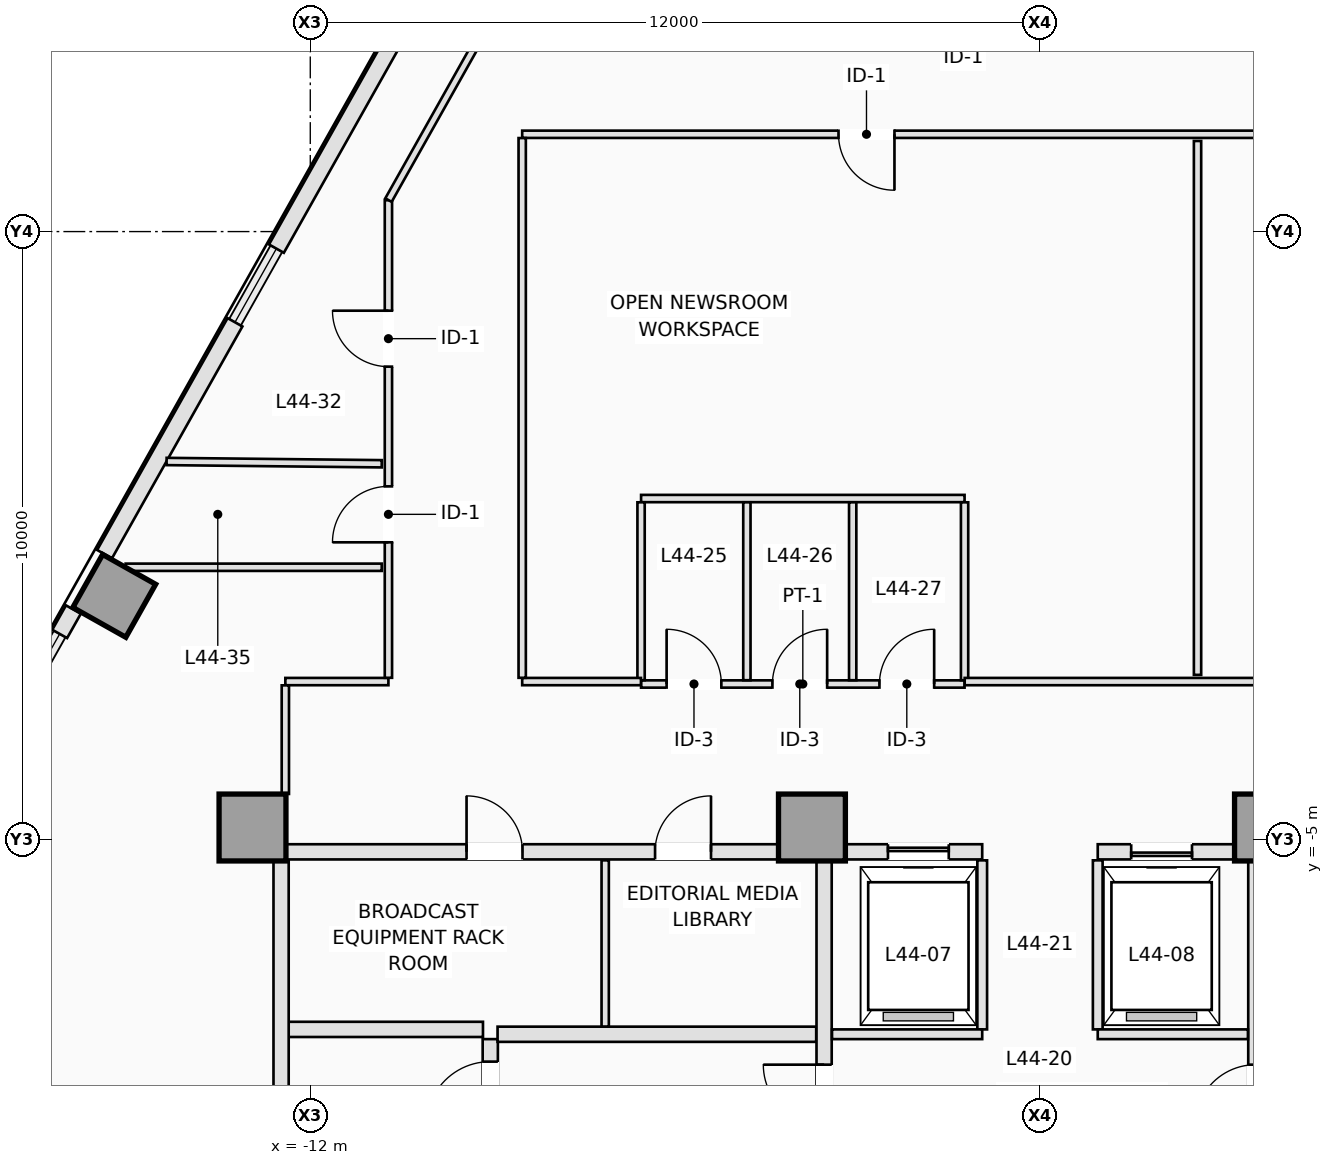
"""IFC4 building model, lengths in metres.
Left out: names, types, materials, properties, quantities, classifications, styles, units other than length and angle.
Written with IfcOpenShell. Run it as: python <this file> out.ifc"""

import sys

from ifc_helpers import new_model, si_unit, direction, frame, frame_2d, origin, origin_2d, place, context, subcontext, project, spatial, rectangle, extrude, element, fill, save


model = new_model("IFC4")
c1 = context("Model", 3, precision=1e-05, world=origin(), true_north=direction((0.0, 1.0)))
c2 = subcontext(c1, "Body", "Model", "MODEL_VIEW")
j1 = project(units=[si_unit("LENGTHUNIT", "METRE"), si_unit("PLANEANGLEUNIT", "RADIAN")], contexts=[c1])
p1 = place(None, origin())
s1 = spatial("IfcSite", under=j1, at=p1, CompositionType="ELEMENT")
p2 = place(p1, origin())
s2 = spatial("IfcBuilding", under=s1, at=p2, CompositionType="ELEMENT")
p3 = place(p2, frame((0.0, 0.0, 161.5)))
s3 = spatial("IfcBuildingStorey", under=s2, at=p3, CompositionType="ELEMENT", Elevation=161.5)
for number, where, z_axis, x_axis in (
    (1, (-12.95, -4.8, 0.0), (0.0, 0.0, 1.0), (1.0, 0.0, 0.0)),
    (2, (-3.75, -4.8, 0.0), (0.0, 0.0, 1.0), (1.0, 0.0, 0.0)),
    (3, (3.75, -4.8, 0.0), (0.0, 0.0, 1.0), (1.0, 0.0, 0.0)),
):
    element("IfcColumn", number, at=place(p3, frame(where, z_axis=z_axis, x_axis=x_axis)), inside=s3, PredefinedType="COLUMN", context=c2, shape_type="SweptSolid", body=[
        extrude(rectangle(XDim=1.1, YDim=1.1, at=origin_2d()), origin(), (0.0, 0.0, 1.0), 3.5),
    ])
p4 = place(p3, frame((-15.224, -0.991, 0.0), z_axis=(0.0, 0.0, 1.0), x_axis=(-0.871575139605, 0.490261946333, 0.0)))
e4 = element("IfcColumn", 4, at=p4, inside=s3, PredefinedType="COLUMN", context=c2, shape_type="SweptSolid", body=[
    extrude(rectangle(XDim=1.0, YDim=1.0, at=origin_2d()), origin(), (0.0, 0.0, 1.0), 3.5),
])
p5 = place(p3, frame((-16.121, -1.616, 0.0), z_axis=(0.0, 0.0, 1.0), x_axis=(0.490009165718, 0.871717280724, 0.0)))
e5 = element("IfcWall", 5, at=p5, inside=s3, PredefinedType="STANDARD", context=c2, shape_type="SweptSolid", body=[
    extrude(rectangle(XDim=0.46, YDim=0.28, at=frame_2d((0.23, 0.0))), origin(), (0.0, 0.0, 1.0), 3.25),
])
p6 = place(p3, frame((-15.383, -0.305, 0.0), z_axis=(0.0, 0.0, 1.0), x_axis=(0.490232095789, 0.871591929895, 0.0)))
e6 = element("IfcWall", 6, at=p6, inside=s3, PredefinedType="STANDARD", context=c2, shape_type="SweptSolid", body=[
    extrude(rectangle(XDim=4.375, YDim=0.28, at=frame_2d((2.188, 0.0))), origin(), (0.0, 0.0, 1.0), 3.25),
])
p7 = place(p3, frame((-12.557, 4.72, 0.0), z_axis=(0.0, 0.0, 1.0), x_axis=(0.490274486291, 0.871568085747, 0.0)))
e7 = element("IfcWall", 7, at=p7, inside=s3, PredefinedType="STANDARD", context=c2, shape_type="SweptSolid", body=[
    extrude(rectangle(XDim=4.375, YDim=0.28, at=frame_2d((2.188, 0.0))), origin(), (0.0, 0.0, 1.0), 3.25),
])
p8 = place(p3, frame((-9.04, -10.18, 0.0), z_axis=(0.0, 0.0, 1.0), x_axis=(0.0, 1.0, 0.0)))
e8 = element("IfcWall", 8, at=p8, inside=s3, PredefinedType="PARTITIONING", context=c2, shape_type="SweptSolid", body=[
    extrude(rectangle(XDim=1.9, YDim=0.25, at=frame_2d((0.95, 0.0))), origin(), (0.0, 0.0, 1.0), 3.25),
])
p9 = place(p8, frame((0.48, 0.0, 0.0)))
e9 = element("IfcOpeningElement", 9, at=p9, cuts=e8, PredefinedType="OPENING", context=c2, shape_type="SweptSolid", body=[
    extrude(rectangle(XDim=1.05, YDim=2.15, at=frame_2d((0.525, 1.075))), frame((0.0, 0.135, 0.0), z_axis=(0.0, -1.0, 0.0), x_axis=(1.0, 0.0, 0.0)), (0.0, 0.0, 1.0), 0.27),
])
p10 = place(p3, frame((-12.38, -8.12, 0.0), z_axis=(0.0, 0.0, 1.0), x_axis=(1.0, 0.0, 0.0)))
e10 = element("IfcWall", 10, at=p10, inside=s3, PredefinedType="PARTITIONING", context=c2, shape_type="SweptSolid", body=[
    extrude(rectangle(XDim=3.22, YDim=0.25, at=frame_2d((1.61, 0.0))), origin(), (0.0, 0.0, 1.0), 3.25),
])
p11 = place(p3, frame((-12.48, -10.18, 0.0), z_axis=(0.0, 0.0, 1.0), x_axis=(0.0, 1.0, 0.0)))
e11 = element("IfcWall", 11, at=p11, inside=s3, PredefinedType="PARTITIONING", context=c2, shape_type="SweptSolid", body=[
    extrude(rectangle(XDim=4.828, YDim=0.25, at=frame_2d((2.414, 0.0))), origin(), (0.0, 0.0, 1.0), 3.25),
])
p12 = place(p3, frame((-8.92, -8.2, 0.0), z_axis=(0.0, 0.0, 1.0), x_axis=(1.0, 0.0, 0.0)))
e12 = element("IfcWall", 12, at=p12, inside=s3, PredefinedType="PARTITIONING", context=c2, shape_type="SweptSolid", body=[
    extrude(rectangle(XDim=5.24, YDim=0.25, at=frame_2d((2.62, 0.0))), origin(), (0.0, 0.0, 1.0), 3.25),
])
p13 = place(p3, frame((-3.55, -15.798, 0.0), z_axis=(0.0, 0.0, 1.0), x_axis=(0.0, 1.0, 0.0)))
e13 = element("IfcWall", 13, at=p13, inside=s3, PredefinedType="PARTITIONING", context=c2, shape_type="SweptSolid", body=[
    extrude(rectangle(XDim=10.446, YDim=0.25, at=frame_2d((5.223, 0.0))), origin(), (0.0, 0.0, 1.0), 3.25),
])
p14 = place(p13, frame((6.098, 0.0, 0.0)))
e14 = element("IfcOpeningElement", 14, at=p14, cuts=e13, PredefinedType="OPENING", context=c2, shape_type="SweptSolid", body=[
    extrude(rectangle(XDim=1.0, YDim=2.15, at=frame_2d((0.5, 1.075))), frame((0.0, 0.135, 0.0), z_axis=(0.0, -1.0, 0.0), x_axis=(1.0, 0.0, 0.0)), (0.0, 0.0, 1.0), 0.27),
])
p15 = place(p3, frame((3.55, -15.798, 0.0), z_axis=(0.0, 0.0, 1.0), x_axis=(0.0, 1.0, 0.0)))
e15 = element("IfcWall", 15, at=p15, inside=s3, PredefinedType="PARTITIONING", context=c2, shape_type="SweptSolid", body=[
    extrude(rectangle(XDim=10.446, YDim=0.25, at=frame_2d((5.223, 0.0))), origin(), (0.0, 0.0, 1.0), 3.25),
])
p16 = place(p15, frame((6.098, 0.0, 0.0)))
e16 = element("IfcOpeningElement", 16, at=p16, cuts=e15, PredefinedType="OPENING", context=c2, shape_type="SweptSolid", body=[
    extrude(rectangle(XDim=1.0, YDim=2.15, at=frame_2d((0.5, 1.075))), frame((0.0, 0.135, 0.0), z_axis=(0.0, -1.0, 0.0), x_axis=(1.0, 0.0, 0.0)), (0.0, 0.0, 1.0), 0.27),
])
p17 = place(p3, frame((-12.398, -5.2, 0.0), z_axis=(0.0, 0.0, 1.0), x_axis=(1.0, 0.0, 0.0)))
e17 = element("IfcWall", 17, at=p17, inside=s3, PredefinedType="PARTITIONING", context=c2, shape_type="SweptSolid", body=[
    extrude(rectangle(XDim=8.096, YDim=0.25, at=frame_2d((4.048, 0.0))), origin(), (0.0, 0.0, 1.0), 3.25),
])
p18 = place(p17, frame((2.968, 0.0, 0.0)))
e18 = element("IfcOpeningElement", 18, at=p18, cuts=e17, PredefinedType="OPENING", context=c2, shape_type="SweptSolid", body=[
    extrude(rectangle(XDim=0.92, YDim=2.12, at=frame_2d((0.46, 1.06))), frame((0.0, 0.135, 0.0), z_axis=(0.0, -1.0, 0.0), x_axis=(1.0, 0.0, 0.0)), (0.0, 0.0, 1.0), 0.27),
])
p19 = place(p17, frame((6.068, 0.0, 0.0)))
e19 = element("IfcOpeningElement", 19, at=p19, cuts=e17, PredefinedType="OPENING", context=c2, shape_type="SweptSolid", body=[
    extrude(rectangle(XDim=0.92, YDim=2.12, at=frame_2d((0.46, 1.06))), frame((0.0, 0.135, 0.0), z_axis=(0.0, -1.0, 0.0), x_axis=(1.0, 0.0, 0.0)), (0.0, 0.0, 1.0), 0.27),
])
p20 = place(p3, frame((-3.198, -5.2, 0.0), z_axis=(0.0, 0.0, 1.0), x_axis=(1.0, 0.0, 0.0)))
e20 = element("IfcWall", 20, at=p20, inside=s3, PredefinedType="PARTITIONING", context=c2, shape_type="SweptSolid", body=[
    extrude(rectangle(XDim=2.248, YDim=0.25, at=frame_2d((1.124, 0.0))), origin(), (0.0, 0.0, 1.0), 3.25),
])
p21 = place(p20, frame((0.698, 0.0, 0.0)))
e21 = element("IfcOpeningElement", 21, at=p21, cuts=e20, PredefinedType="OPENING", context=c2, shape_type="SweptSolid", body=[
    extrude(rectangle(XDim=1.0, YDim=2.15, at=frame_2d((0.5, 1.075))), frame((0.0, 0.135, 0.0), z_axis=(0.0, -1.0, 0.0), x_axis=(1.0, 0.0, 0.0)), (0.0, 0.0, 1.0), 0.27),
])
p22 = place(p3, frame((0.95, -5.2, 0.0), z_axis=(0.0, 0.0, 1.0), x_axis=(1.0, 0.0, 0.0)))
e22 = element("IfcWall", 22, at=p22, inside=s3, PredefinedType="PARTITIONING", context=c2, shape_type="SweptSolid", body=[
    extrude(rectangle(XDim=2.248, YDim=0.25, at=frame_2d((1.124, 0.0))), origin(), (0.0, 0.0, 1.0), 3.25),
])
p23 = place(p22, frame((0.55, 0.0, 0.0)))
e23 = element("IfcOpeningElement", 23, at=p23, cuts=e22, PredefinedType="OPENING", context=c2, shape_type="SweptSolid", body=[
    extrude(rectangle(XDim=1.0, YDim=2.15, at=frame_2d((0.5, 1.075))), frame((0.0, 0.135, 0.0), z_axis=(0.0, -1.0, 0.0), x_axis=(1.0, 0.0, 0.0)), (0.0, 0.0, 1.0), 0.27),
])
p24 = place(p3, frame((-7.15, -8.073, 0.0), z_axis=(0.0, 0.0, 1.0), x_axis=(0.0, 1.0, 0.0)))
e24 = element("IfcWall", 24, at=p24, inside=s3, PredefinedType="PARTITIONING", context=c2, shape_type="SweptSolid", body=[
    extrude(rectangle(XDim=2.733, YDim=0.12, at=frame_2d((1.366, 0.0))), origin(), (0.0, 0.0, 1.0), 3.25),
])
for number, where, z_axis, x_axis in (
    (25, (-0.95, -8.12, 0.0), (0.0, 0.0, 1.0), (0.0, 1.0, 0.0)),
    (26, (0.95, -8.12, 0.0), (0.0, 0.0, 1.0), (0.0, 1.0, 0.0)),
):
    element("IfcWall", number, at=place(p3, frame(where, z_axis=z_axis, x_axis=x_axis)), inside=s3, PredefinedType="PARTITIONING", context=c2, shape_type="SweptSolid", body=[
        extrude(rectangle(XDim=2.78, YDim=0.16, at=frame_2d((1.39, 0.0))), origin(), (0.0, 0.0, 1.0), 3.25),
    ])
for number, where, z_axis, x_axis in (
    (27, (-3.42, -8.2, 0.0), (0.0, 0.0, 1.0), (1.0, 0.0, 0.0)),
    (28, (0.95, -8.2, 0.0), (0.0, 0.0, 1.0), (1.0, 0.0, 0.0)),
):
    element("IfcWall", number, at=place(p3, frame(where, z_axis=z_axis, x_axis=x_axis)), inside=s3, PredefinedType="PARTITIONING", context=c2, shape_type="SweptSolid", body=[
        extrude(rectangle(XDim=2.47, YDim=0.16, at=frame_2d((1.235, 0.0))), origin(), (0.0, 0.0, 1.0), 3.25),
    ])
p25 = place(p3, frame((-6.56, -2.44, 0.0), z_axis=(0.0, 0.0, 1.0), x_axis=(1.0, 0.0, 0.0)))
e29 = element("IfcWall", 29, at=p25, inside=s3, PredefinedType="PARTITIONING", context=c2, shape_type="SweptSolid", body=[
    extrude(rectangle(XDim=5.32, YDim=0.12, at=frame_2d((2.66, 0.0))), origin(), (0.0, 0.0, 1.0), 2.891),
])
p26 = place(p25, frame((0.42, 0.0, 0.0)))
e30 = element("IfcOpeningElement", 30, at=p26, cuts=e29, PredefinedType="OPENING", context=c2, shape_type="SweptSolid", body=[
    extrude(rectangle(XDim=0.9, YDim=2.12, at=frame_2d((0.45, 1.06))), frame((0.0, 0.07, 0.0), z_axis=(0.0, -1.0, 0.0), x_axis=(1.0, 0.0, 0.0)), (0.0, 0.0, 1.0), 0.14),
])
p27 = place(p25, frame((2.16, 0.0, 0.0)))
e31 = element("IfcOpeningElement", 31, at=p27, cuts=e29, PredefinedType="OPENING", context=c2, shape_type="SweptSolid", body=[
    extrude(rectangle(XDim=0.9, YDim=2.12, at=frame_2d((0.45, 1.06))), frame((0.0, 0.07, 0.0), z_axis=(0.0, -1.0, 0.0), x_axis=(1.0, 0.0, 0.0)), (0.0, 0.0, 1.0), 0.14),
])
p28 = place(p25, frame((3.92, 0.0, 0.0)))
e32 = element("IfcOpeningElement", 32, at=p28, cuts=e29, PredefinedType="OPENING", context=c2, shape_type="SweptSolid", body=[
    extrude(rectangle(XDim=0.9, YDim=2.12, at=frame_2d((0.45, 1.06))), frame((0.0, 0.07, 0.0), z_axis=(0.0, -1.0, 0.0), x_axis=(1.0, 0.0, 0.0)), (0.0, 0.0, 1.0), 0.14),
])
p29 = place(p3, frame((-6.56, 0.61, 0.0), z_axis=(0.0, 0.0, 1.0), x_axis=(1.0, 0.0, 0.0)))
e33 = element("IfcWall", 33, at=p29, inside=s3, PredefinedType="PARTITIONING", context=c2, shape_type="SweptSolid", body=[
    extrude(rectangle(XDim=5.32, YDim=0.12, at=frame_2d((2.66, 0.0))), origin(), (0.0, 0.0, 1.0), 3.25),
])
for number, where, z_axis, x_axis in (
    (34, (-6.56, -2.378, 0.0), (0.0, 0.0, 1.0), (0.0, 1.0, 0.0)),
    (35, (-4.82, -2.378, 0.0), (0.0, 0.0, 1.0), (0.0, 1.0, 0.0)),
    (36, (-3.08, -2.378, 0.0), (0.0, 0.0, 1.0), (0.0, 1.0, 0.0)),
    (37, (-1.24, -2.378, 0.0), (0.0, 0.0, 1.0), (0.0, 1.0, 0.0)),
):
    element("IfcWall", number, at=place(p3, frame(where, z_axis=z_axis, x_axis=x_axis)), inside=s3, PredefinedType="PARTITIONING", context=c2, shape_type="SweptSolid", body=[
        extrude(rectangle(XDim=2.926, YDim=0.12, at=frame_2d((1.463, 0.0))), origin(), (0.0, 0.0, 1.0), 3.25),
    ])
p30 = place(p3, frame((-12.41, -2.4, 0.0), z_axis=(0.0, 0.0, 1.0), x_axis=(1.0, 0.0, 0.0)))
e38 = element("IfcWall", 38, at=p30, inside=s3, PredefinedType="PARTITIONING", context=c2, shape_type="SweptSolid", body=[
    extrude(rectangle(XDim=1.695, YDim=0.12, at=frame_2d((0.847, 0.0))), origin(), (0.0, 0.0, 1.0), 3.25),
])
p31 = place(p3, frame((-10.715, -2.338, 0.0), z_axis=(0.0, 0.0, 1.0), x_axis=(0.0, 1.0, 0.0)))
e39 = element("IfcWall", 39, at=p31, inside=s3, PredefinedType="PARTITIONING", context=c2, shape_type="SweptSolid", body=[
    extrude(rectangle(XDim=7.854, YDim=0.12, at=frame_2d((3.927, 0.0))), origin(), (0.0, 0.0, 1.0), 3.25),
])
p32 = place(p31, frame((5.117, 0.0, 0.0)))
e40 = element("IfcOpeningElement", 40, at=p32, cuts=e39, PredefinedType="OPENING", context=c2, shape_type="SweptSolid", body=[
    extrude(rectangle(XDim=0.92, YDim=2.12, at=frame_2d((0.46, 1.06))), frame((0.0, 0.07, 0.0), z_axis=(0.0, -1.0, 0.0), x_axis=(1.0, 0.0, 0.0)), (0.0, 0.0, 1.0), 0.14),
])
p33 = place(p31, frame((2.228, 0.0, 0.0)))
e41 = element("IfcOpeningElement", 41, at=p33, cuts=e39, PredefinedType="OPENING", context=c2, shape_type="SweptSolid", body=[
    extrude(rectangle(XDim=0.92, YDim=2.12, at=frame_2d((0.46, 1.06))), frame((0.0, 0.07, 0.0), z_axis=(0.0, -1.0, 0.0), x_axis=(1.0, 0.0, 0.0)), (0.0, 0.0, 1.0), 0.14),
])
p34 = place(p3, frame((-10.714, 5.518, 0.0), z_axis=(0.0, 0.0, 1.0), x_axis=(0.490248927543, 0.871582462561, 0.0)))
e42 = element("IfcWall", 42, at=p34, inside=s3, PredefinedType="PARTITIONING", context=c2, shape_type="SweptSolid", body=[
    extrude(rectangle(XDim=3.766, YDim=0.12, at=frame_2d((1.883, 0.0))), origin(), (0.0, 0.0, 1.0), 3.25),
])
p35 = place(p3, frame((-12.41, -4.248, 0.0), z_axis=(0.0, 0.0, 1.0), x_axis=(0.0, 1.0, 0.0)))
e43 = element("IfcWall", 43, at=p35, inside=s3, PredefinedType="PARTITIONING", context=c2, shape_type="SweptSolid", body=[
    extrude(rectangle(XDim=1.786, YDim=0.12, at=frame_2d((0.893, 0.0))), origin(), (0.0, 0.0, 1.0), 3.25),
])
p36 = place(p3, frame((-8.515, -2.4, 0.0), z_axis=(0.0, 0.0, 1.0), x_axis=(1.0, 0.0, 0.0)))
e44 = element("IfcWall", 44, at=p36, inside=s3, PredefinedType="PARTITIONING", context=c2, shape_type="SweptSolid", body=[
    extrude(rectangle(XDim=1.953, YDim=0.12, at=frame_2d((0.977, 0.0))), origin(), (0.0, 0.0, 1.0), 3.25),
])
p37 = place(p3, frame((-1.238, -2.4, 0.0), z_axis=(0.0, 0.0, 1.0), x_axis=(1.0, 0.0, 0.0)))
e45 = element("IfcWall", 45, at=p37, inside=s3, PredefinedType="PARTITIONING", context=c2, shape_type="SweptSolid", body=[
    extrude(rectangle(XDim=10.023, YDim=0.12, at=frame_2d((5.011, 0.0))), origin(), (0.0, 0.0, 1.0), 2.891),
])
p38 = place(p3, frame((8.723, 6.6, 0.0), z_axis=(0.0, 0.0, 1.0), x_axis=(-1.0, 0.0, 0.0)))
e46 = element("IfcWall", 46, at=p38, inside=s3, PredefinedType="PARTITIONING", context=c2, shape_type="SweptSolid", body=[
    extrude(rectangle(XDim=17.238, YDim=0.12, at=frame_2d((8.619, 0.0))), origin(), (0.0, 0.0, 1.0), 2.891),
])
p39 = place(p38, frame((11.116, 0.0, 0.0)))
e47 = element("IfcOpeningElement", 47, at=p39, cuts=e46, PredefinedType="OPENING", context=c2, shape_type="SweptSolid", body=[
    extrude(rectangle(XDim=0.92, YDim=2.12, at=frame_2d((0.46, 1.06))), frame((0.0, 0.07, 0.0), z_axis=(0.0, -1.0, 0.0), x_axis=(1.0, 0.0, 0.0)), (0.0, 0.0, 1.0), 0.14),
])
p40 = place(p3, frame((-8.515, 6.538, 0.0), z_axis=(0.0, 0.0, 1.0), x_axis=(0.0, -1.0, 0.0)))
e48 = element("IfcWall", 48, at=p40, inside=s3, PredefinedType="PARTITIONING", context=c2, shape_type="SweptSolid", body=[
    extrude(rectangle(XDim=8.876, YDim=0.12, at=frame_2d((4.438, 0.0))), origin(), (0.0, 0.0, 1.0), 3.25),
])
p41 = place(p3, frame((-10.825, 1.182, 0.0), z_axis=(0.0, 0.0, 1.0), x_axis=(-0.999943542972, 0.010625952637, 0.0)))
e49 = element("IfcWall", 49, at=p41, inside=s3, PredefinedType="PARTITIONING", context=c2, shape_type="SweptSolid", body=[
    extrude(rectangle(XDim=3.538, YDim=0.12, at=frame_2d((1.769, 0.0))), origin(), (0.0, 0.0, 1.0), 3.25),
])
p42 = place(p3, frame((2.591, 6.49, 0.0), z_axis=(0.0, 0.0, 1.0), x_axis=(0.0, -1.0, 0.0)))
e50 = element("IfcWall", 50, at=p42, inside=s3, PredefinedType="PARTITIONING", context=c2, shape_type="SweptSolid", body=[
    extrude(rectangle(XDim=8.78, YDim=0.12, at=frame_2d((4.39, 0.0))), origin(), (0.0, 0.0, 1.0), 3.25),
])
p43 = place(p3, frame((-10.825, -0.52, 0.0), z_axis=(0.0, 0.0, 1.0), x_axis=(-1.0, 0.0, 0.0)))
e51 = element("IfcWall", 51, at=p43, inside=s3, PredefinedType="PARTITIONING", context=c2, shape_type="SweptSolid", body=[
    extrude(rectangle(XDim=4.211, YDim=0.12, at=frame_2d((2.106, 0.0))), origin(), (0.0, 0.0, 1.0), 3.25),
])
p44 = place(p21, origin())
e52 = element("IfcDoor", 52, at=p44, inside=s3, OperationType="SLIDING_TO_LEFT", PredefinedType="DOOR", context=c2, shape_type="SweptSolid", body=[
    extrude(rectangle(XDim=1.0, YDim=2.15, at=frame_2d((0.5, 1.075))), frame((0.0, 0.025, 0.0), z_axis=(0.0, -1.0, 0.0), x_axis=(1.0, 0.0, 0.0)), (0.0, 0.0, 1.0), 0.05),
])
fill(e21, e52)
p45 = place(p23, origin())
e53 = element("IfcDoor", 53, at=p45, inside=s3, OperationType="SLIDING_TO_RIGHT", PredefinedType="DOOR", context=c2, shape_type="SweptSolid", body=[
    extrude(rectangle(XDim=1.0, YDim=2.15, at=frame_2d((0.5, 1.075))), frame((0.0, 0.025, 0.0), z_axis=(0.0, -1.0, 0.0), x_axis=(1.0, 0.0, 0.0)), (0.0, 0.0, 1.0), 0.05),
])
fill(e23, e53)
p46 = place(p9, origin())
e54 = element("IfcDoor", 54, at=p46, inside=s3, OperationType="SINGLE_SWING_LEFT", PredefinedType="DOOR", context=c2, shape_type="SweptSolid", body=[
    extrude(rectangle(XDim=1.05, YDim=2.15, at=frame_2d((0.525, 1.075))), frame((0.0, 0.025, 0.0), z_axis=(0.0, -1.0, 0.0), x_axis=(1.0, 0.0, 0.0)), (0.0, 0.0, 1.0), 0.05),
])
fill(e9, e54)
p47 = place(p14, origin())
e55 = element("IfcDoor", 55, at=p47, inside=s3, OperationType="SINGLE_SWING_RIGHT", PredefinedType="DOOR", context=c2, shape_type="SweptSolid", body=[
    extrude(rectangle(XDim=1.0, YDim=2.15, at=frame_2d((0.5, 1.075))), frame((0.0, 0.025, 0.0), z_axis=(0.0, -1.0, 0.0), x_axis=(1.0, 0.0, 0.0)), (0.0, 0.0, 1.0), 0.05),
])
fill(e14, e55)
p48 = place(p18, origin())
e56 = element("IfcDoor", 56, at=p48, inside=s3, OperationType="SINGLE_SWING_LEFT", PredefinedType="DOOR", context=c2, shape_type="SweptSolid", body=[
    extrude(rectangle(XDim=0.92, YDim=2.12, at=frame_2d((0.46, 1.06))), frame((0.0, 0.025, 0.0), z_axis=(0.0, -1.0, 0.0), x_axis=(1.0, 0.0, 0.0)), (0.0, 0.0, 1.0), 0.05),
])
fill(e18, e56)
p49 = place(p19, origin())
e57 = element("IfcDoor", 57, at=p49, inside=s3, OperationType="SINGLE_SWING_RIGHT", PredefinedType="DOOR", context=c2, shape_type="SweptSolid", body=[
    extrude(rectangle(XDim=0.92, YDim=2.12, at=frame_2d((0.46, 1.06))), frame((0.0, 0.025, 0.0), z_axis=(0.0, -1.0, 0.0), x_axis=(1.0, 0.0, 0.0)), (0.0, 0.0, 1.0), 0.05),
])
fill(e19, e57)
p50 = place(p26, origin())
e58 = element("IfcDoor", 58, at=p50, inside=s3, OperationType="SINGLE_SWING_LEFT", PredefinedType="DOOR", context=c2, shape_type="SweptSolid", body=[
    extrude(rectangle(XDim=0.9, YDim=2.12, at=frame_2d((0.45, 1.06))), frame((0.0, 0.025, 0.0), z_axis=(0.0, -1.0, 0.0), x_axis=(1.0, 0.0, 0.0)), (0.0, 0.0, 1.0), 0.05),
])
fill(e30, e58)
p51 = place(p27, origin())
e59 = element("IfcDoor", 59, at=p51, inside=s3, OperationType="SINGLE_SWING_RIGHT", PredefinedType="DOOR", context=c2, shape_type="SweptSolid", body=[
    extrude(rectangle(XDim=0.9, YDim=2.12, at=frame_2d((0.45, 1.06))), frame((0.0, 0.025, 0.0), z_axis=(0.0, -1.0, 0.0), x_axis=(1.0, 0.0, 0.0)), (0.0, 0.0, 1.0), 0.05),
])
fill(e31, e59)
p52 = place(p28, origin())
e60 = element("IfcDoor", 60, at=p52, inside=s3, OperationType="SINGLE_SWING_RIGHT", PredefinedType="DOOR", context=c2, shape_type="SweptSolid", body=[
    extrude(rectangle(XDim=0.9, YDim=2.12, at=frame_2d((0.45, 1.06))), frame((0.0, 0.025, 0.0), z_axis=(0.0, -1.0, 0.0), x_axis=(1.0, 0.0, 0.0)), (0.0, 0.0, 1.0), 0.05),
])
fill(e32, e60)
p53 = place(p32, origin())
e61 = element("IfcDoor", 61, at=p53, inside=s3, OperationType="SINGLE_SWING_RIGHT", PredefinedType="DOOR", context=c2, shape_type="SweptSolid", body=[
    extrude(rectangle(XDim=0.92, YDim=2.12, at=frame_2d((0.46, 1.06))), frame((0.0, 0.025, 0.0), z_axis=(0.0, -1.0, 0.0), x_axis=(1.0, 0.0, 0.0)), (0.0, 0.0, 1.0), 0.05),
])
fill(e40, e61)
p54 = place(p39, origin())
e62 = element("IfcDoor", 62, at=p54, inside=s3, OperationType="SINGLE_SWING_LEFT", PredefinedType="DOOR", context=c2, shape_type="SweptSolid", body=[
    extrude(rectangle(XDim=0.92, YDim=2.12, at=frame_2d((0.46, 1.06))), frame((0.0, 0.025, 0.0), z_axis=(0.0, -1.0, 0.0), x_axis=(1.0, 0.0, 0.0)), (0.0, 0.0, 1.0), 0.05),
])
fill(e47, e62)
p55 = place(p33, origin())
e63 = element("IfcDoor", 63, at=p55, inside=s3, OperationType="SINGLE_SWING_LEFT", PredefinedType="DOOR", context=c2, shape_type="SweptSolid", body=[
    extrude(rectangle(XDim=0.92, YDim=2.12, at=frame_2d((0.46, 1.06))), frame((0.0, 0.025, 0.0), z_axis=(0.0, -1.0, 0.0), x_axis=(1.0, 0.0, 0.0)), (0.0, 0.0, 1.0), 0.05),
])
fill(e41, e63)
save(model, sys.argv[1])
